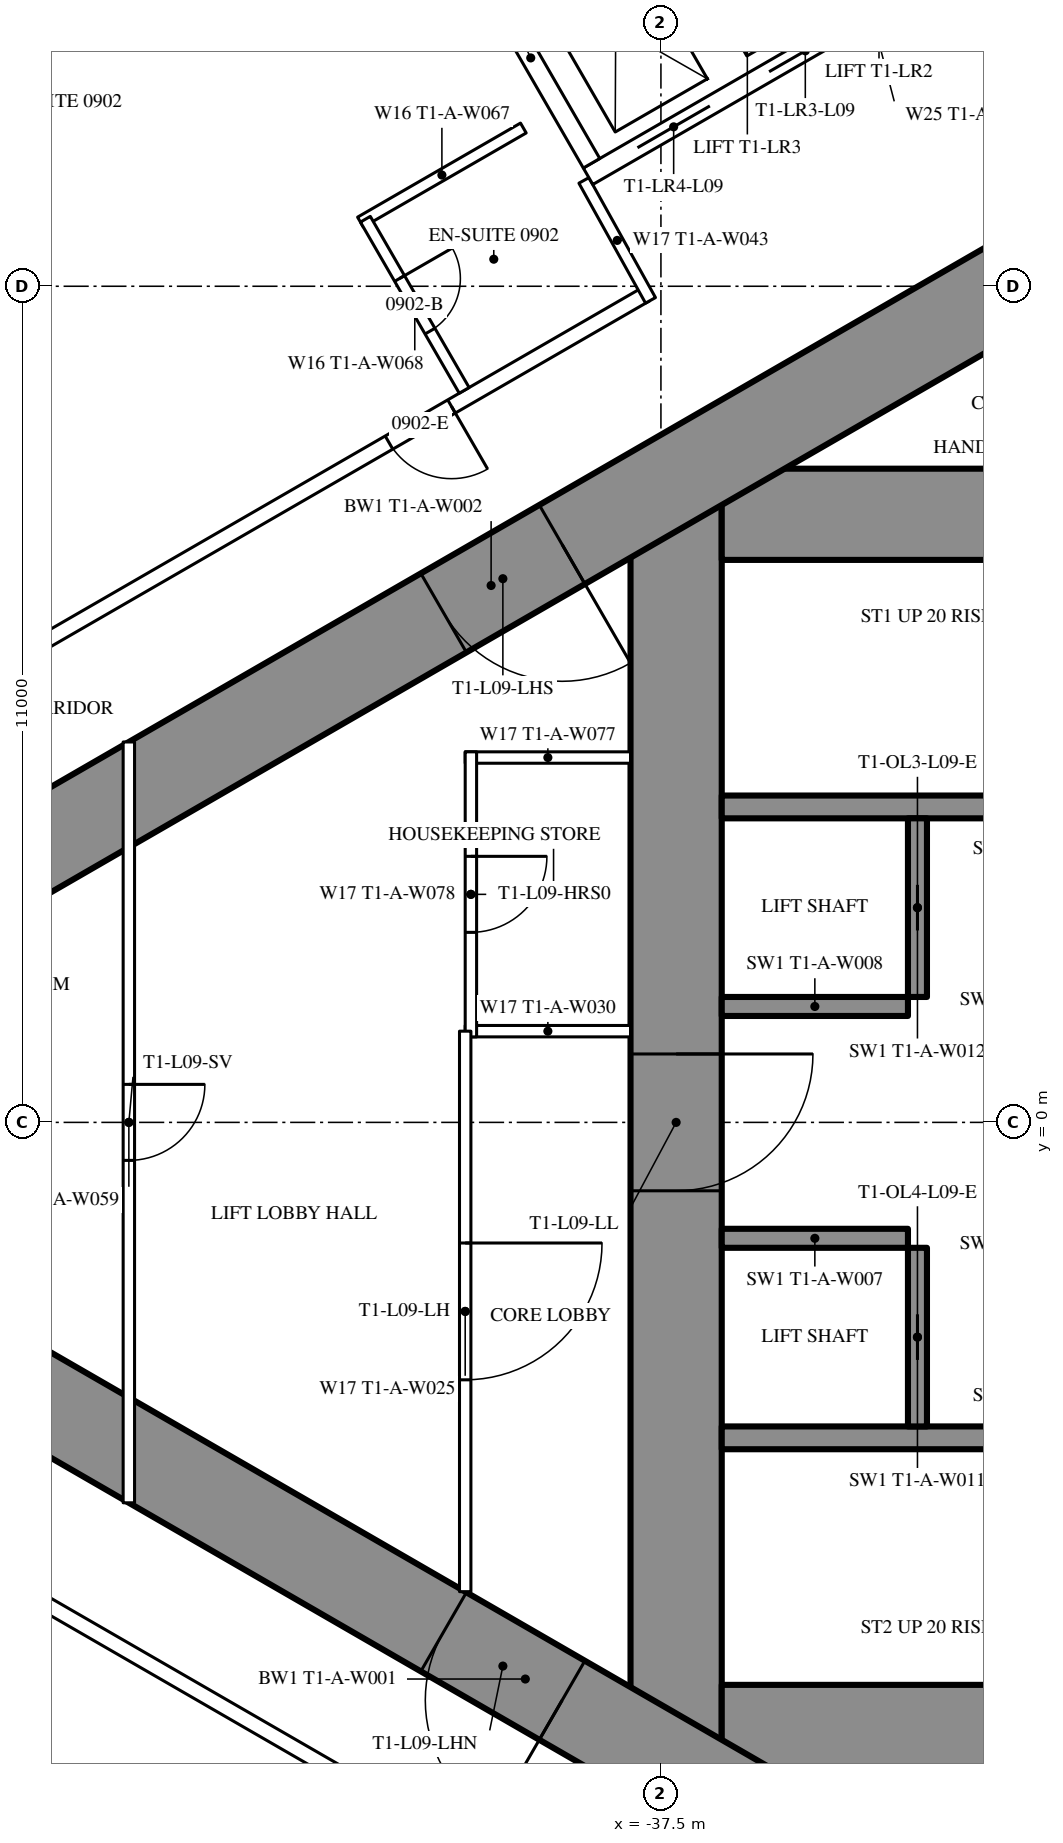
"""IFC4 building model, lengths in metres.
Left out: names, types, materials, properties, quantities, classifications, styles, units other than length and angle.
Written with IfcOpenShell. Run it as: python <this file> out.ifc"""

import sys

from ifc_helpers import new_model, si_unit, direction, frame, frame_2d, origin, place, context, subcontext, project, spatial, rectangle, extrude, element, fill, save


model = new_model("IFC4")
c1 = context("Model", 3, precision=1e-05, world=origin(), true_north=direction((0.0, 1.0)))
c2 = subcontext(c1, "Body", "Model", "MODEL_VIEW")
j1 = project(units=[si_unit("LENGTHUNIT", "METRE"), si_unit("PLANEANGLEUNIT", "RADIAN")], contexts=[c1])
p1 = place(None, origin())
s1 = spatial("IfcSite", under=j1, at=p1, CompositionType="ELEMENT")
p2 = place(p1, origin())
s2 = spatial("IfcBuilding", under=s1, at=p2, CompositionType="ELEMENT")
p3 = place(p2, frame((0.0, 0.0, 39.0)))
s3 = spatial("IfcBuildingStorey", under=s2, at=p3, CompositionType="ELEMENT", Elevation=39.0)
p4 = place(p3, frame((-37.3, 8.6, 0.0), z_axis=(0.0, 0.0, 1.0), x_axis=(0.0, -1.0, 0.0)))
e1 = element("IfcWall", 1, at=p4, inside=s3, PredefinedType="SHEAR", context=c2, shape_type="SweptSolid", body=[
    extrude(rectangle(XDim=17.2, YDim=1.2, at=frame_2d((8.6, 0.0))), origin(), (0.0, 0.0, 1.0), 3.5),
])
p5 = place(p4, frame((7.7, 0.0, 0.0)))
e2 = element("IfcOpeningElement", 2, at=p5, cuts=e1, PredefinedType="OPENING", context=c2, shape_type="SweptSolid", body=[
    extrude(rectangle(XDim=1.8, YDim=2.2, at=frame_2d((0.9, 1.1))), frame((0.0, 0.61, 0.0), z_axis=(0.0, -1.0, 0.0), x_axis=(1.0, 0.0, 0.0)), (0.0, 0.0, 1.0), 1.22),
])
p6 = place(p3, frame((-28.3, 8.0, 0.0), z_axis=(0.0, 0.0, 1.0), x_axis=(-1.0, 0.0, 0.0)))
e3 = element("IfcWall", 3, at=p6, inside=s3, PredefinedType="SHEAR", context=c2, shape_type="SweptSolid", body=[
    extrude(rectangle(XDim=8.4, YDim=1.2, at=frame_2d((4.2, 0.0))), origin(), (0.0, 0.0, 1.0), 3.5),
])
p7 = place(p6, frame((0.25, 0.0, 0.0)))
e4 = element("IfcOpeningElement", 4, at=p7, cuts=e3, PredefinedType="OPENING", context=c2, shape_type="SweptSolid", body=[
    extrude(rectangle(XDim=1.0, YDim=2.2, at=frame_2d((0.5, 1.1))), frame((0.0, 0.61, 0.0), z_axis=(0.0, -1.0, 0.0), x_axis=(1.0, 0.0, 0.0)), (0.0, 0.0, 1.0), 1.22),
])
p8 = place(p3, frame((-28.3, -8.0, 0.0), z_axis=(0.0, 0.0, 1.0), x_axis=(-1.0, 0.0, 0.0)))
e5 = element("IfcWall", 5, at=p8, inside=s3, PredefinedType="SHEAR", context=c2, shape_type="SweptSolid", body=[
    extrude(rectangle(XDim=8.4, YDim=1.2, at=frame_2d((4.2, 0.0))), origin(), (0.0, 0.0, 1.0), 3.5),
])
p9 = place(p8, frame((0.25, 0.0, 0.0)))
e6 = element("IfcOpeningElement", 6, at=p9, cuts=e5, PredefinedType="OPENING", context=c2, shape_type="SweptSolid", body=[
    extrude(rectangle(XDim=1.0, YDim=2.2, at=frame_2d((0.5, 1.1))), frame((0.0, 0.61, 0.0), z_axis=(0.0, -1.0, 0.0), x_axis=(1.0, 0.0, 0.0)), (0.0, 0.0, 1.0), 1.22),
])
for number, where, z_axis, x_axis in (
    (7, (-28.3, 4.15, 0.0), (0.0, 0.0, 1.0), (-1.0, 0.0, 0.0)),
    (8, (-28.3, -4.15, 0.0), (0.0, 0.0, 1.0), (-1.0, 0.0, 0.0)),
):
    element("IfcWall", number, at=place(p3, frame(where, z_axis=z_axis, x_axis=x_axis)), inside=s3, PredefinedType="SHEAR", context=c2, shape_type="SweptSolid", body=[
        extrude(rectangle(XDim=8.4, YDim=0.3, at=frame_2d((4.2, 0.0))), origin(), (0.0, 0.0, 1.0), 3.5),
    ])
p10 = place(p3, frame((-34.125, 4.0, 0.0), z_axis=(0.0, 0.0, 1.0), x_axis=(0.0, -1.0, 0.0)))
e9 = element("IfcWall", 9, at=p10, inside=s3, PredefinedType="SHEAR", context=c2, shape_type="SweptSolid", body=[
    extrude(rectangle(XDim=2.35, YDim=0.25, at=frame_2d((1.175, 0.0))), origin(), (0.0, 0.0, 1.0), 3.5),
])
p11 = place(p10, frame((0.875, 0.0, 0.0)))
e10 = element("IfcOpeningElement", 10, at=p11, cuts=e9, PredefinedType="OPENING", context=c2, shape_type="SweptSolid", body=[
    extrude(rectangle(XDim=0.6, YDim=2.0, at=frame_2d((0.3, 1.0))), frame((0.0, 0.135, 0.0), z_axis=(0.0, -1.0, 0.0), x_axis=(1.0, 0.0, 0.0)), (0.0, 0.0, 1.0), 0.27),
])
p12 = place(p3, frame((-34.25, 1.525, 0.0), z_axis=(0.0, 0.0, 1.0), x_axis=(-1.0, 0.0, 0.0)))
e11 = element("IfcWall", 11, at=p12, inside=s3, PredefinedType="SHEAR", context=c2, shape_type="SweptSolid", body=[
    extrude(rectangle(XDim=2.45, YDim=0.25, at=frame_2d((1.225, 0.0))), origin(), (0.0, 0.0, 1.0), 3.5),
])
p13 = place(p3, frame((-34.125, -1.65, 0.0), z_axis=(0.0, 0.0, 1.0), x_axis=(0.0, -1.0, 0.0)))
e12 = element("IfcWall", 12, at=p13, inside=s3, PredefinedType="SHEAR", context=c2, shape_type="SweptSolid", body=[
    extrude(rectangle(XDim=2.35, YDim=0.25, at=frame_2d((1.175, 0.0))), origin(), (0.0, 0.0, 1.0), 3.5),
])
p14 = place(p13, frame((0.875, 0.0, 0.0)))
e13 = element("IfcOpeningElement", 13, at=p14, cuts=e12, PredefinedType="OPENING", context=c2, shape_type="SweptSolid", body=[
    extrude(rectangle(XDim=0.6, YDim=2.0, at=frame_2d((0.3, 1.0))), frame((0.0, 0.135, 0.0), z_axis=(0.0, -1.0, 0.0), x_axis=(1.0, 0.0, 0.0)), (0.0, 0.0, 1.0), 0.27),
])
p15 = place(p3, frame((-34.25, -1.525, 0.0), z_axis=(0.0, 0.0, 1.0), x_axis=(-1.0, 0.0, 0.0)))
e14 = element("IfcWall", 14, at=p15, inside=s3, PredefinedType="SHEAR", context=c2, shape_type="SweptSolid", body=[
    extrude(rectangle(XDim=2.45, YDim=0.25, at=frame_2d((1.225, 0.0))), origin(), (0.0, 0.0, 1.0), 3.5),
])
p16 = place(p3, frame((-27.2, 14.3, 0.0), z_axis=(0.0, 0.0, 1.0), x_axis=(-0.866026593062, -0.499997940104, 0.0)))
e15 = element("IfcWall", 15, at=p16, inside=s3, PredefinedType="SHEAR", context=c2, shape_type="SweptSolid", body=[
    extrude(rectangle(XDim=28.946, YDim=1.2, at=frame_2d((14.473, 0.0))), origin(), (0.0, 0.0, 1.0), 3.5),
])
p17 = place(p16, frame((4.6, 0.0, 0.0)))
e16 = element("IfcOpeningElement", 16, at=p17, cuts=e15, PredefinedType="OPENING", context=c2, shape_type="SweptSolid", body=[
    extrude(rectangle(XDim=1.0, YDim=2.2, at=frame_2d((0.5, 1.1))), frame((0.0, 0.61, 0.0), z_axis=(0.0, -1.0, 0.0), x_axis=(1.0, 0.0, 0.0)), (0.0, 0.0, 1.0), 1.22),
])
p18 = place(p16, frame((13.395, 0.0, 0.0)))
e17 = element("IfcOpeningElement", 17, at=p18, cuts=e15, PredefinedType="OPENING", context=c2, shape_type="SweptSolid", body=[
    extrude(rectangle(XDim=1.8, YDim=2.2, at=frame_2d((0.9, 1.1))), frame((0.0, 0.61, 0.0), z_axis=(0.0, -1.0, 0.0), x_axis=(1.0, 0.0, 0.0)), (0.0, 0.0, 1.0), 1.22),
])
p19 = place(p3, frame((-27.2, -14.3, 0.0), z_axis=(0.0, 0.0, 1.0), x_axis=(-0.866024021859, 0.500002393557, 0.0)))
e18 = element("IfcWall", 18, at=p19, inside=s3, PredefinedType="SHEAR", context=c2, shape_type="SweptSolid", body=[
    extrude(rectangle(XDim=27.907, YDim=1.2, at=frame_2d((13.954, 0.0))), origin(), (0.0, 0.0, 1.0), 3.5),
])
p20 = place(p19, frame((4.6, 0.0, 0.0)))
e19 = element("IfcOpeningElement", 19, at=p20, cuts=e18, PredefinedType="OPENING", context=c2, shape_type="SweptSolid", body=[
    extrude(rectangle(XDim=1.0, YDim=2.2, at=frame_2d((0.5, 1.1))), frame((0.0, 0.61, 0.0), z_axis=(0.0, -1.0, 0.0), x_axis=(1.0, 0.0, 0.0)), (0.0, 0.0, 1.0), 1.22),
])
p21 = place(p19, frame((13.395, 0.0, 0.0)))
e20 = element("IfcOpeningElement", 20, at=p21, cuts=e18, PredefinedType="OPENING", context=c2, shape_type="SweptSolid", body=[
    extrude(rectangle(XDim=1.8, YDim=2.2, at=frame_2d((0.9, 1.1))), frame((0.0, 0.61, 0.0), z_axis=(0.0, -1.0, 0.0), x_axis=(1.0, 0.0, 0.0)), (0.0, 0.0, 1.0), 1.22),
])
p22 = place(p3, frame((-37.7, 10.894, 0.0), z_axis=(0.0, 0.0, 1.0), x_axis=(-0.866027905338, -0.499995667157, 0.0)))
e21 = element("IfcWall", 21, at=p22, inside=s3, PredefinedType="PARTITIONING", context=c2, shape_type="SweptSolid", body=[
    extrude(rectangle(XDim=21.787, YDim=0.2, at=frame_2d((10.894, 0.0))), origin(), (0.0, 0.0, 1.0), 3.25),
])
p23 = place(p22, frame((11.78, 0.0, 0.0)))
e22 = element("IfcOpeningElement", 22, at=p23, cuts=e21, PredefinedType="OPENING", context=c2, shape_type="SweptSolid", body=[
    extrude(rectangle(XDim=0.95, YDim=2.2, at=frame_2d((0.475, 1.1))), frame((0.0, 0.11, 0.0), z_axis=(0.0, -1.0, 0.0), x_axis=(1.0, 0.0, 0.0)), (0.0, 0.0, 1.0), 0.22),
])
p24 = place(p22, frame((2.95, 0.0, 0.0)))
e23 = element("IfcOpeningElement", 23, at=p24, cuts=e21, PredefinedType="OPENING", context=c2, shape_type="SweptSolid", body=[
    extrude(rectangle(XDim=0.95, YDim=2.2, at=frame_2d((0.475, 1.1))), frame((0.0, 0.11, 0.0), z_axis=(0.0, -1.0, 0.0), x_axis=(1.0, 0.0, 0.0)), (0.0, 0.0, 1.0), 0.22),
])
p25 = place(p3, frame((-36.92, -11.344, 0.0), z_axis=(0.0, 0.0, 1.0), x_axis=(-0.866028313256, 0.499994960614, 0.0)))
e24 = element("IfcWall", 24, at=p25, inside=s3, PredefinedType="PARTITIONING", context=c2, shape_type="SweptSolid", body=[
    extrude(rectangle(XDim=22.568, YDim=0.2, at=frame_2d((11.284, 0.0))), origin(), (0.0, 0.0, 1.0), 3.25),
])
p26 = place(p25, frame((21.018, 0.0, 0.0)))
e25 = element("IfcOpeningElement", 25, at=p26, cuts=e24, PredefinedType="OPENING", context=c2, shape_type="SweptSolid", body=[
    extrude(rectangle(XDim=0.95, YDim=2.2, at=frame_2d((0.475, 1.1))), frame((0.0, 0.11, 0.0), z_axis=(0.0, -1.0, 0.0), x_axis=(1.0, 0.0, 0.0)), (0.0, 0.0, 1.0), 0.22),
])
p27 = place(p25, frame((3.35, 0.0, 0.0)))
e26 = element("IfcOpeningElement", 26, at=p27, cuts=e24, PredefinedType="OPENING", context=c2, shape_type="SweptSolid", body=[
    extrude(rectangle(XDim=1.0, YDim=2.2, at=frame_2d((0.5, 1.1))), frame((0.0, 0.11, 0.0), z_axis=(0.0, -1.0, 0.0), x_axis=(1.0, 0.0, 0.0)), (0.0, 0.0, 1.0), 0.22),
])
p28 = place(p3, frame((-38.513, 12.392, 0.0), z_axis=(0.0, 0.0, 1.0), x_axis=(0.485585508183, -0.874189175317, 0.0)))
e27 = element("IfcWall", 27, at=p28, inside=s3, PredefinedType="PARTITIONING", context=c2, shape_type="SweptSolid", body=[
    extrude(rectangle(XDim=1.805, YDim=0.15, at=frame_2d((0.902, 0.0))), origin(), (0.0, 0.0, 1.0), 3.25),
])
p29 = place(p3, frame((-39.31, 13.082, 0.0), z_axis=(0.0, 0.0, 1.0), x_axis=(-0.866031185235, -0.4999899861, 0.0)))
e28 = element("IfcWall", 28, at=p29, inside=s3, PredefinedType="PARTITIONING", context=c2, shape_type="SweptSolid", body=[
    extrude(rectangle(XDim=2.475, YDim=0.15, at=frame_2d((1.238, 0.0))), origin(), (0.0, 0.0, 1.0), 3.25),
])
p30 = place(p3, frame((-40.088, 9.63, 0.0), z_axis=(0.0, 0.0, 1.0), x_axis=(-0.500006934395, 0.866021400173, 0.0)))
e29 = element("IfcWall", 29, at=p30, inside=s3, PredefinedType="PARTITIONING", context=c2, shape_type="SweptSolid", body=[
    extrude(rectangle(XDim=2.6, YDim=0.15, at=frame_2d((1.3, 0.0))), origin(), (0.0, 0.0, 1.0), 3.25),
])
p31 = place(p30, frame((0.9, 0.0, 0.0)))
e30 = element("IfcOpeningElement", 30, at=p31, cuts=e29, PredefinedType="OPENING", context=c2, shape_type="SweptSolid", body=[
    extrude(rectangle(XDim=0.8, YDim=2.2, at=frame_2d((0.4, 1.1))), frame((0.0, 0.085, 0.0), z_axis=(0.0, -1.0, 0.0), x_axis=(1.0, 0.0, 0.0)), (0.0, 0.0, 1.0), 0.17),
])
for number, where, z_axis, x_axis in (
    (31, (-37.9, 1.2, 0.0), (0.0, 0.0, 1.0), (-1.0, 0.0, 0.0)),
    (32, (-37.9, 4.8, 0.0), (0.0, 0.0, 1.0), (-1.0, 0.0, 0.0)),
):
    element("IfcWall", number, at=place(p3, frame(where, z_axis=z_axis, x_axis=x_axis)), inside=s3, PredefinedType="PARTITIONING", context=c2, shape_type="SweptSolid", body=[
        extrude(rectangle(XDim=2.175, YDim=0.15, at=frame_2d((1.087, 0.0))), origin(), (0.0, 0.0, 1.0), 3.25),
    ])
p32 = place(p3, frame((-40.0, 4.875, 0.0), z_axis=(0.0, 0.0, 1.0), x_axis=(0.0, -1.0, 0.0)))
e33 = element("IfcWall", 33, at=p32, inside=s3, PredefinedType="PARTITIONING", context=c2, shape_type="SweptSolid", body=[
    extrude(rectangle(XDim=3.75, YDim=0.15, at=frame_2d((1.875, 0.0))), origin(), (0.0, 0.0, 1.0), 3.25),
])
p33 = place(p32, frame((1.375, 0.0, 0.0)))
e34 = element("IfcOpeningElement", 34, at=p33, cuts=e33, PredefinedType="OPENING", context=c2, shape_type="SweptSolid", body=[
    extrude(rectangle(XDim=1.0, YDim=2.2, at=frame_2d((0.5, 1.1))), frame((0.0, 0.085, 0.0), z_axis=(0.0, -1.0, 0.0), x_axis=(1.0, 0.0, 0.0)), (0.0, 0.0, 1.0), 0.17),
])
p34 = place(p3, frame((-40.075, 1.2, 0.0), z_axis=(0.0, 0.0, 1.0), x_axis=(0.0, -1.0, 0.0)))
e35 = element("IfcWall", 35, at=p34, inside=s3, PredefinedType="PARTITIONING", context=c2, shape_type="SweptSolid", body=[
    extrude(rectangle(XDim=7.374, YDim=0.15, at=frame_2d((3.687, 0.0))), origin(), (0.0, 0.0, 1.0), 3.25),
])
p35 = place(p34, frame((2.787, 0.0, 0.0)))
e36 = element("IfcOpeningElement", 36, at=p35, cuts=e35, PredefinedType="OPENING", context=c2, shape_type="SweptSolid", body=[
    extrude(rectangle(XDim=1.8, YDim=2.2, at=frame_2d((0.9, 1.1))), frame((0.0, 0.085, 0.0), z_axis=(0.0, -1.0, 0.0), x_axis=(1.0, 0.0, 0.0)), (0.0, 0.0, 1.0), 0.17),
])
p36 = place(p3, frame((-44.5, 5.005, 0.0), z_axis=(0.0, 0.0, 1.0), x_axis=(0.0, -1.0, 0.0)))
e37 = element("IfcWall", 37, at=p36, inside=s3, PredefinedType="PARTITIONING", context=c2, shape_type="SweptSolid", body=[
    extrude(rectangle(XDim=10.009, YDim=0.15, at=frame_2d((5.005, 0.0))), origin(), (0.0, 0.0, 1.0), 2.45),
])
p37 = place(p36, frame((4.505, 0.0, 0.0)))
e38 = element("IfcOpeningElement", 38, at=p37, cuts=e37, PredefinedType="OPENING", context=c2, shape_type="SweptSolid", body=[
    extrude(rectangle(XDim=1.0, YDim=2.2, at=frame_2d((0.5, 1.1))), frame((0.0, 0.085, 0.0), z_axis=(0.0, -1.0, 0.0), x_axis=(1.0, 0.0, 0.0)), (0.0, 0.0, 1.0), 0.17),
])
p38 = place(p3, frame((-31.01, 16.747, 0.0), z_axis=(0.0, 0.0, 1.0), x_axis=(-0.866028165386, -0.499995216735, 0.0)))
e39 = element("IfcWall", 39, at=p38, inside=s3, PredefinedType="PARTITIONING", context=c2, shape_type="SweptSolid", body=[
    extrude(rectangle(XDim=8.6, YDim=0.25, at=frame_2d((4.3, 0.0))), origin(), (0.0, 0.0, 1.0), 3.25),
])
p39 = place(p38, frame((0.75, 0.0, 0.0)))
e40 = element("IfcOpeningElement", 40, at=p39, cuts=e39, PredefinedType="OPENING", context=c2, shape_type="SweptSolid", body=[
    extrude(rectangle(XDim=1.1, YDim=2.2, at=frame_2d((0.55, 1.1))), frame((0.0, 0.135, 0.0), z_axis=(0.0, -1.0, 0.0), x_axis=(1.0, 0.0, 0.0)), (0.0, 0.0, 1.0), 0.27),
])
p40 = place(p38, frame((2.75, 0.0, 0.0)))
e41 = element("IfcOpeningElement", 41, at=p40, cuts=e39, PredefinedType="OPENING", context=c2, shape_type="SweptSolid", body=[
    extrude(rectangle(XDim=1.1, YDim=2.2, at=frame_2d((0.55, 1.1))), frame((0.0, 0.135, 0.0), z_axis=(0.0, -1.0, 0.0), x_axis=(1.0, 0.0, 0.0)), (0.0, 0.0, 1.0), 0.27),
])
p41 = place(p38, frame((4.75, 0.0, 0.0)))
e42 = element("IfcOpeningElement", 42, at=p41, cuts=e39, PredefinedType="OPENING", context=c2, shape_type="SweptSolid", body=[
    extrude(rectangle(XDim=1.1, YDim=2.2, at=frame_2d((0.55, 1.1))), frame((0.0, 0.135, 0.0), z_axis=(0.0, -1.0, 0.0), x_axis=(1.0, 0.0, 0.0)), (0.0, 0.0, 1.0), 0.27),
])
p42 = place(p38, frame((6.75, 0.0, 0.0)))
e43 = element("IfcOpeningElement", 43, at=p42, cuts=e39, PredefinedType="OPENING", context=c2, shape_type="SweptSolid", body=[
    extrude(rectangle(XDim=1.1, YDim=2.2, at=frame_2d((0.55, 1.1))), frame((0.0, 0.135, 0.0), z_axis=(0.0, -1.0, 0.0), x_axis=(1.0, 0.0, 0.0)), (0.0, 0.0, 1.0), 0.27),
])
p43 = place(p3, frame((-38.413, 12.618, 0.0), z_axis=(0.0, 0.0, 1.0), x_axis=(-0.499872130319, 0.866099216793, 0.0)))
e44 = element("IfcWall", 44, at=p43, inside=s3, PredefinedType="PARTITIONING", context=c2, shape_type="SweptSolid", body=[
    extrude(rectangle(XDim=3.2, YDim=0.25, at=frame_2d((1.6, 0.0))), origin(), (0.0, 0.0, 1.0), 3.25),
])
p44 = place(p31, origin())
e45 = element("IfcDoor", 45, at=p44, inside=s3, OperationType="SINGLE_SWING_RIGHT", PredefinedType="DOOR", context=c2, shape_type="SweptSolid", body=[
    extrude(rectangle(XDim=0.8, YDim=2.2, at=frame_2d((0.4, 1.1))), frame((0.0, 0.025, 0.0), z_axis=(0.0, -1.0, 0.0), x_axis=(1.0, 0.0, 0.0)), (0.0, 0.0, 1.0), 0.05),
])
fill(e30, e45)
p45 = place(p24, origin())
e46 = element("IfcDoor", 46, at=p45, inside=s3, OperationType="SINGLE_SWING_LEFT", PredefinedType="DOOR", context=c2, shape_type="SweptSolid", body=[
    extrude(rectangle(XDim=0.95, YDim=2.2, at=frame_2d((0.475, 1.1))), frame((0.0, 0.025, 0.0), z_axis=(0.0, -1.0, 0.0), x_axis=(1.0, 0.0, 0.0)), (0.0, 0.0, 1.0), 0.05),
])
fill(e23, e46)
p46 = place(p33, origin())
e47 = element("IfcDoor", 47, at=p46, inside=s3, OperationType="SINGLE_SWING_LEFT", PredefinedType="DOOR", context=c2, shape_type="SweptSolid", body=[
    extrude(rectangle(XDim=1.0, YDim=2.2, at=frame_2d((0.5, 1.1))), frame((0.0, 0.025, 0.0), z_axis=(0.0, -1.0, 0.0), x_axis=(1.0, 0.0, 0.0)), (0.0, 0.0, 1.0), 0.05),
])
fill(e34, e47)
p47 = place(p35, origin())
e48 = element("IfcDoor", 48, at=p47, inside=s3, OperationType="DOUBLE_DOOR_SINGLE_SWING", PredefinedType="DOOR", context=c2, shape_type="SweptSolid", body=[
    extrude(rectangle(XDim=1.8, YDim=2.2, at=frame_2d((0.9, 1.1))), frame((0.0, 0.025, 0.0), z_axis=(0.0, -1.0, 0.0), x_axis=(1.0, 0.0, 0.0)), (0.0, 0.0, 1.0), 0.05),
])
fill(e36, e48)
p48 = place(p37, origin())
e49 = element("IfcDoor", 49, at=p48, inside=s3, OperationType="SINGLE_SWING_LEFT", PredefinedType="DOOR", context=c2, shape_type="SweptSolid", body=[
    extrude(rectangle(XDim=1.0, YDim=2.2, at=frame_2d((0.5, 1.1))), frame((0.0, 0.025, 0.0), z_axis=(0.0, -1.0, 0.0), x_axis=(1.0, 0.0, 0.0)), (0.0, 0.0, 1.0), 0.05),
])
fill(e38, e49)
p49 = place(p18, origin())
e50 = element("IfcDoor", 50, at=p49, inside=s3, OperationType="DOUBLE_DOOR_SINGLE_SWING", PredefinedType="DOOR", context=c2, shape_type="SweptSolid", body=[
    extrude(rectangle(XDim=1.8, YDim=2.2, at=frame_2d((0.9, 1.1))), frame((0.0, 0.025, 0.0), z_axis=(0.0, -1.0, 0.0), x_axis=(1.0, 0.0, 0.0)), (0.0, 0.0, 1.0), 0.05),
])
fill(e17, e50)
p50 = place(p21, origin())
e51 = element("IfcDoor", 51, at=p50, inside=s3, OperationType="DOUBLE_DOOR_SINGLE_SWING", PredefinedType="DOOR", context=c2, shape_type="SweptSolid", body=[
    extrude(rectangle(XDim=1.8, YDim=2.2, at=frame_2d((0.9, 1.1))), frame((0.0, 0.025, 0.0), z_axis=(0.0, -1.0, 0.0), x_axis=(1.0, 0.0, 0.0)), (0.0, 0.0, 1.0), 0.05),
])
fill(e20, e51)
p51 = place(p5, origin())
e52 = element("IfcDoor", 52, at=p51, inside=s3, OperationType="DOUBLE_DOOR_SINGLE_SWING", PredefinedType="DOOR", context=c2, shape_type="SweptSolid", body=[
    extrude(rectangle(XDim=1.8, YDim=2.2, at=frame_2d((0.9, 1.1))), frame((0.0, 0.025, 0.0), z_axis=(0.0, -1.0, 0.0), x_axis=(1.0, 0.0, 0.0)), (0.0, 0.0, 1.0), 0.05),
])
fill(e2, e52)
p52 = place(p11, origin())
e53 = element("IfcDoor", 53, at=p52, inside=s3, OperationType="SLIDING_TO_LEFT", PredefinedType="DOOR", context=c2, shape_type="SweptSolid", body=[
    extrude(rectangle(XDim=0.6, YDim=2.0, at=frame_2d((0.3, 1.0))), frame((0.0, 0.025, 0.0), z_axis=(0.0, -1.0, 0.0), x_axis=(1.0, 0.0, 0.0)), (0.0, 0.0, 1.0), 0.05),
])
fill(e10, e53)
p53 = place(p14, origin())
e54 = element("IfcDoor", 54, at=p53, inside=s3, OperationType="SLIDING_TO_LEFT", PredefinedType="DOOR", context=c2, shape_type="SweptSolid", body=[
    extrude(rectangle(XDim=0.6, YDim=2.0, at=frame_2d((0.3, 1.0))), frame((0.0, 0.025, 0.0), z_axis=(0.0, -1.0, 0.0), x_axis=(1.0, 0.0, 0.0)), (0.0, 0.0, 1.0), 0.05),
])
fill(e13, e54)
p54 = place(p41, origin())
e55 = element("IfcDoor", 55, at=p54, inside=s3, OperationType="DOUBLE_DOOR_SLIDING", PredefinedType="USERDEFINED", context=c2, shape_type="SweptSolid", body=[
    extrude(rectangle(XDim=1.1, YDim=2.2, at=frame_2d((0.55, 1.1))), frame((0.0, 0.025, 0.0), z_axis=(0.0, -1.0, 0.0), x_axis=(1.0, 0.0, 0.0)), (0.0, 0.0, 1.0), 0.05),
])
fill(e42, e55)
p55 = place(p42, origin())
e56 = element("IfcDoor", 56, at=p55, inside=s3, OperationType="DOUBLE_DOOR_SLIDING", PredefinedType="USERDEFINED", context=c2, shape_type="SweptSolid", body=[
    extrude(rectangle(XDim=1.1, YDim=2.2, at=frame_2d((0.55, 1.1))), frame((0.0, 0.025, 0.0), z_axis=(0.0, -1.0, 0.0), x_axis=(1.0, 0.0, 0.0)), (0.0, 0.0, 1.0), 0.05),
])
fill(e43, e56)
save(model, sys.argv[1])
